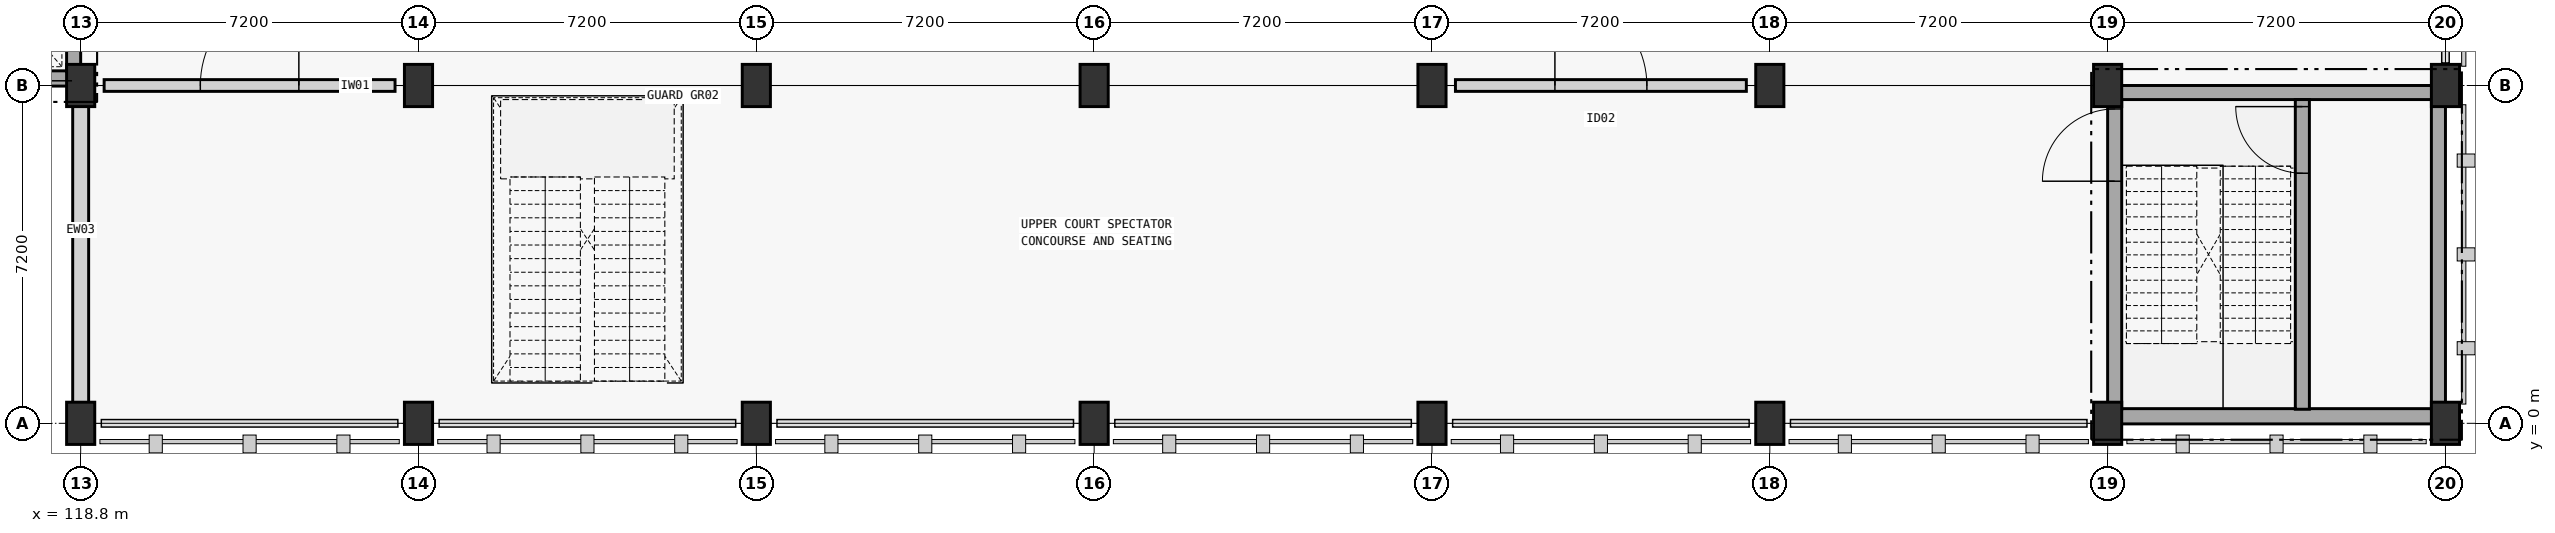
"""IFC4 building model, lengths in metres.
Left out: names, types, materials, properties, quantities, classifications, styles, units other than length and angle.
Written with IfcOpenShell. Run it as: python <this file> out.ifc"""

import sys

from ifc_helpers import new_model, si_unit, direction, frame, frame_2d, origin, origin_2d, place, context, subcontext, project, spatial, rectangle, extrude, element, fill, save


model = new_model("IFC4")
c1 = context("Model", 3, precision=1e-05, world=origin(), true_north=direction((0.0, 1.0)))
c2 = subcontext(c1, "Body", "Model", "MODEL_VIEW")
j1 = project(units=[si_unit("LENGTHUNIT", "METRE"), si_unit("PLANEANGLEUNIT", "RADIAN")], contexts=[c1])
p1 = place(None, origin())
s1 = spatial("IfcSite", under=j1, at=p1, CompositionType="ELEMENT")
p2 = place(p1, origin())
s2 = spatial("IfcBuilding", under=s1, at=p2, CompositionType="ELEMENT")
p3 = place(p2, frame((0.0, 0.0, 10.8)))
s3 = spatial("IfcBuildingStorey", under=s2, at=p3, CompositionType="ELEMENT", Elevation=10.8)
for number, where, z_axis, x_axis in (
    (1, (118.8, 0.0, 0.0), (0.0, 0.0, 1.0), (1.0, 0.0, 0.0)),
    (2, (118.8, 7.2, 0.0), (0.0, 0.0, 1.0), (1.0, 0.0, 0.0)),
    (3, (126.0, 0.0, 0.0), (0.0, 0.0, 1.0), (1.0, 0.0, 0.0)),
    (4, (126.0, 7.2, 0.0), (0.0, 0.0, 1.0), (1.0, 0.0, 0.0)),
    (5, (133.2, 0.0, 0.0), (0.0, 0.0, 1.0), (1.0, 0.0, 0.0)),
    (6, (133.2, 7.2, 0.0), (0.0, 0.0, 1.0), (1.0, 0.0, 0.0)),
    (7, (140.4, 0.0, 0.0), (0.0, 0.0, 1.0), (1.0, 0.0, 0.0)),
    (8, (140.4, 7.2, 0.0), (0.0, 0.0, 1.0), (1.0, 0.0, 0.0)),
    (9, (147.6, 0.0, 0.0), (0.0, 0.0, 1.0), (1.0, 0.0, 0.0)),
    (10, (147.6, 7.2, 0.0), (0.0, 0.0, 1.0), (1.0, 0.0, 0.0)),
    (11, (154.8, 0.0, 0.0), (0.0, 0.0, 1.0), (1.0, 0.0, 0.0)),
    (12, (154.8, 7.2, 0.0), (0.0, 0.0, 1.0), (1.0, 0.0, 0.0)),
    (13, (162.0, 0.0, 0.0), (0.0, 0.0, 1.0), (1.0, 0.0, 0.0)),
    (14, (162.0, 7.2, 0.0), (0.0, 0.0, 1.0), (1.0, 0.0, 0.0)),
    (15, (169.2, 0.0, 0.0), (0.0, 0.0, 1.0), (1.0, 0.0, 0.0)),
    (16, (169.2, 7.2, 0.0), (0.0, 0.0, 1.0), (1.0, 0.0, 0.0)),
):
    element("IfcColumn", number, at=place(p3, frame(where, z_axis=z_axis, x_axis=x_axis)), inside=s3, PredefinedType="COLUMN", context=c2, shape_type="SweptSolid", body=[
        extrude(rectangle(XDim=0.6, YDim=0.9, at=origin_2d()), origin(), (0.0, 0.0, 1.0), 4.2),
    ])
p4 = place(p3, frame((118.8, 7.35, 0.0), z_axis=(0.0, 0.0, 1.0), x_axis=(-1.0, 0.0, 0.0)))
e17 = element("IfcWall", 17, at=p4, inside=s3, PredefinedType="SHEAR", context=c2, shape_type="SweptSolid", body=[
    extrude(rectangle(XDim=7.2, YDim=0.325, at=frame_2d((3.6, 0.0))), origin(), (0.0, 0.0, 1.0), 4.2),
])
p5 = place(p3, frame((118.65, 17.7, 0.0), z_axis=(0.0, 0.0, 1.0), x_axis=(0.0, -1.0, 0.0)))
e18 = element("IfcWall", 18, at=p5, inside=s3, PredefinedType="SHEAR", context=c2, shape_type="SweptSolid", body=[
    extrude(rectangle(XDim=10.2, YDim=0.3, at=frame_2d((5.1, 0.0))), origin(), (0.0, 0.0, 1.0), 4.2),
])
p6 = place(p3, frame((169.2, 0.15, 0.0), z_axis=(0.0, 0.0, 1.0), x_axis=(-1.0, 0.0, 0.0)))
e19 = element("IfcWall", 19, at=p6, inside=s3, PredefinedType="SHEAR", context=c2, shape_type="SweptSolid", body=[
    extrude(rectangle(XDim=7.2, YDim=0.325, at=frame_2d((3.6, 0.0))), origin(), (0.0, 0.0, 1.0), 4.2),
])
p7 = place(p3, frame((162.0, 7.05, 0.0), z_axis=(0.0, 0.0, 1.0), x_axis=(1.0, 0.0, 0.0)))
e20 = element("IfcWall", 20, at=p7, inside=s3, PredefinedType="SHEAR", context=c2, shape_type="SweptSolid", body=[
    extrude(rectangle(XDim=7.2, YDim=0.3, at=frame_2d((3.6, 0.0))), origin(), (0.0, 0.0, 1.0), 4.2),
])
p8 = place(p3, frame((162.15, 0.3, 0.0), z_axis=(0.0, 0.0, 1.0), x_axis=(0.0, 1.0, 0.0)))
e21 = element("IfcWall", 21, at=p8, inside=s3, PredefinedType="SHEAR", context=c2, shape_type="SweptSolid", body=[
    extrude(rectangle(XDim=6.6, YDim=0.3, at=frame_2d((3.3, 0.0))), origin(), (0.0, 0.0, 1.0), 4.2),
])
p9 = place(p8, frame((4.86, 0.0, 0.0)))
e22 = element("IfcOpeningElement", 22, at=p9, cuts=e21, PredefinedType="OPENING", context=c2, shape_type="SweptSolid", body=[
    extrude(rectangle(XDim=1.54, YDim=2.22, at=frame_2d((0.77, 1.11))), frame((0.0, 0.15, 0.0), z_axis=(0.0, -1.0, 0.0), x_axis=(1.0, 0.0, 0.0)), (0.0, 0.0, 1.0), 0.3),
])
p10 = place(p3, frame((169.05, 6.9, 0.0), z_axis=(0.0, 0.0, 1.0), x_axis=(0.0, -1.0, 0.0)))
e23 = element("IfcWall", 23, at=p10, inside=s3, PredefinedType="SHEAR", context=c2, shape_type="SweptSolid", body=[
    extrude(rectangle(XDim=6.6, YDim=0.3, at=frame_2d((3.3, 0.0))), origin(), (0.0, 0.0, 1.0), 4.2),
])
p11 = place(p3, frame((166.15, 0.3, 0.0), z_axis=(0.0, 0.0, 1.0), x_axis=(0.0, 1.0, 0.0)))
e24 = element("IfcWall", 24, at=p11, inside=s3, PredefinedType="SHEAR", context=c2, shape_type="SweptSolid", body=[
    extrude(rectangle(XDim=6.6, YDim=0.3, at=frame_2d((3.3, 0.0))), origin(), (0.0, 0.0, 1.0), 4.2),
])
p12 = place(p11, frame((5.03, 0.0, 0.0)))
e25 = element("IfcOpeningElement", 25, at=p12, cuts=e24, PredefinedType="OPENING", context=c2, shape_type="SweptSolid", body=[
    extrude(rectangle(XDim=1.42, YDim=2.2, at=frame_2d((0.71, 1.1))), frame((0.0, 0.15, 0.0), z_axis=(0.0, -1.0, 0.0), x_axis=(1.0, 0.0, 0.0)), (0.0, 0.0, 1.0), 0.3),
])
p13 = place(p3, frame((118.8, 0.44, -0.05), z_axis=(0.0, 0.0, 1.0), x_axis=(0.0, 1.0, 0.0)))
e26 = element("IfcWall", 26, at=p13, inside=s3, PredefinedType="STANDARD", context=c2, shape_type="SweptSolid", body=[
    extrude(rectangle(XDim=6.32, YDim=0.34, at=frame_2d((3.16, 0.0))), origin(), (0.0, 0.0, 1.0), 3.625),
])
p14 = place(p3, frame((119.3, 7.2, 0.0), z_axis=(0.0, 0.0, 1.0), x_axis=(1.0, 0.0, 0.0)))
e27 = element("IfcWall", 27, at=p14, inside=s3, PredefinedType="STANDARD", context=c2, shape_type="SweptSolid", body=[
    extrude(rectangle(XDim=6.2, YDim=0.25, at=frame_2d((3.1, 0.0))), origin(), (0.0, 0.0, 1.0), 3.04),
])
p15 = place(p14, frame((2.05, 0.0, 0.0)))
e28 = element("IfcOpeningElement", 28, at=p15, cuts=e27, PredefinedType="OPENING", context=c2, shape_type="SweptSolid", body=[
    extrude(rectangle(XDim=2.1, YDim=2.4, at=frame_2d((1.05, 1.2))), frame((0.0, 0.125, 0.0), z_axis=(0.0, -1.0, 0.0), x_axis=(1.0, 0.0, 0.0)), (0.0, 0.0, 1.0), 0.25),
])
p16 = place(p3, frame((148.1, 7.2, 0.0), z_axis=(0.0, 0.0, 1.0), x_axis=(1.0, 0.0, 0.0)))
e29 = element("IfcWall", 29, at=p16, inside=s3, PredefinedType="STANDARD", context=c2, shape_type="SweptSolid", body=[
    extrude(rectangle(XDim=6.2, YDim=0.25, at=frame_2d((3.1, 0.0))), origin(), (0.0, 0.0, 1.0), 3.04),
])
p17 = place(p16, frame((2.12, 0.0, 0.0)))
e30 = element("IfcOpeningElement", 30, at=p17, cuts=e29, PredefinedType="OPENING", context=c2, shape_type="SweptSolid", body=[
    extrude(rectangle(XDim=1.96, YDim=2.36, at=frame_2d((0.98, 1.18))), frame((0.0, 0.125, 0.0), z_axis=(0.0, -1.0, 0.0), x_axis=(1.0, 0.0, 0.0)), (0.0, 0.0, 1.0), 0.25),
])
p18 = place(p12, origin())
e31 = element("IfcDoor", 31, at=p18, inside=s3, OperationType="SINGLE_SWING_RIGHT", PredefinedType="DOOR", context=c2, shape_type="SweptSolid", body=[
    extrude(rectangle(XDim=1.42, YDim=2.2, at=frame_2d((0.71, 1.1))), frame((0.0, 0.025, 0.0), z_axis=(0.0, -1.0, 0.0), x_axis=(1.0, 0.0, 0.0)), (0.0, 0.0, 1.0), 0.05),
])
fill(e25, e31)
p19 = place(p9, origin())
e32 = element("IfcDoor", 32, at=p19, inside=s3, OperationType="SINGLE_SWING_LEFT", PredefinedType="DOOR", context=c2, shape_type="SweptSolid", body=[
    extrude(rectangle(XDim=1.54, YDim=2.22, at=frame_2d((0.77, 1.11))), frame((0.0, 0.025, 0.0), z_axis=(0.0, -1.0, 0.0), x_axis=(1.0, 0.0, 0.0)), (0.0, 0.0, 1.0), 0.05),
])
fill(e22, e32)
p20 = place(p15, origin())
e33 = element("IfcDoor", 33, at=p20, inside=s3, OperationType="SINGLE_SWING_RIGHT", PredefinedType="DOOR", context=c2, shape_type="SweptSolid", body=[
    extrude(rectangle(XDim=2.1, YDim=2.4, at=frame_2d((1.05, 1.2))), frame((0.0, 0.025, 0.0), z_axis=(0.0, -1.0, 0.0), x_axis=(1.0, 0.0, 0.0)), (0.0, 0.0, 1.0), 0.05),
])
fill(e28, e33)
p21 = place(p17, origin())
e34 = element("IfcDoor", 34, at=p21, inside=s3, OperationType="SINGLE_SWING_LEFT", PredefinedType="DOOR", context=c2, shape_type="SweptSolid", body=[
    extrude(rectangle(XDim=1.96, YDim=2.36, at=frame_2d((0.98, 1.18))), frame((0.0, 0.025, 0.0), z_axis=(0.0, -1.0, 0.0), x_axis=(1.0, 0.0, 0.0)), (0.0, 0.0, 1.0), 0.05),
])
fill(e30, e34)
save(model, sys.argv[1])
